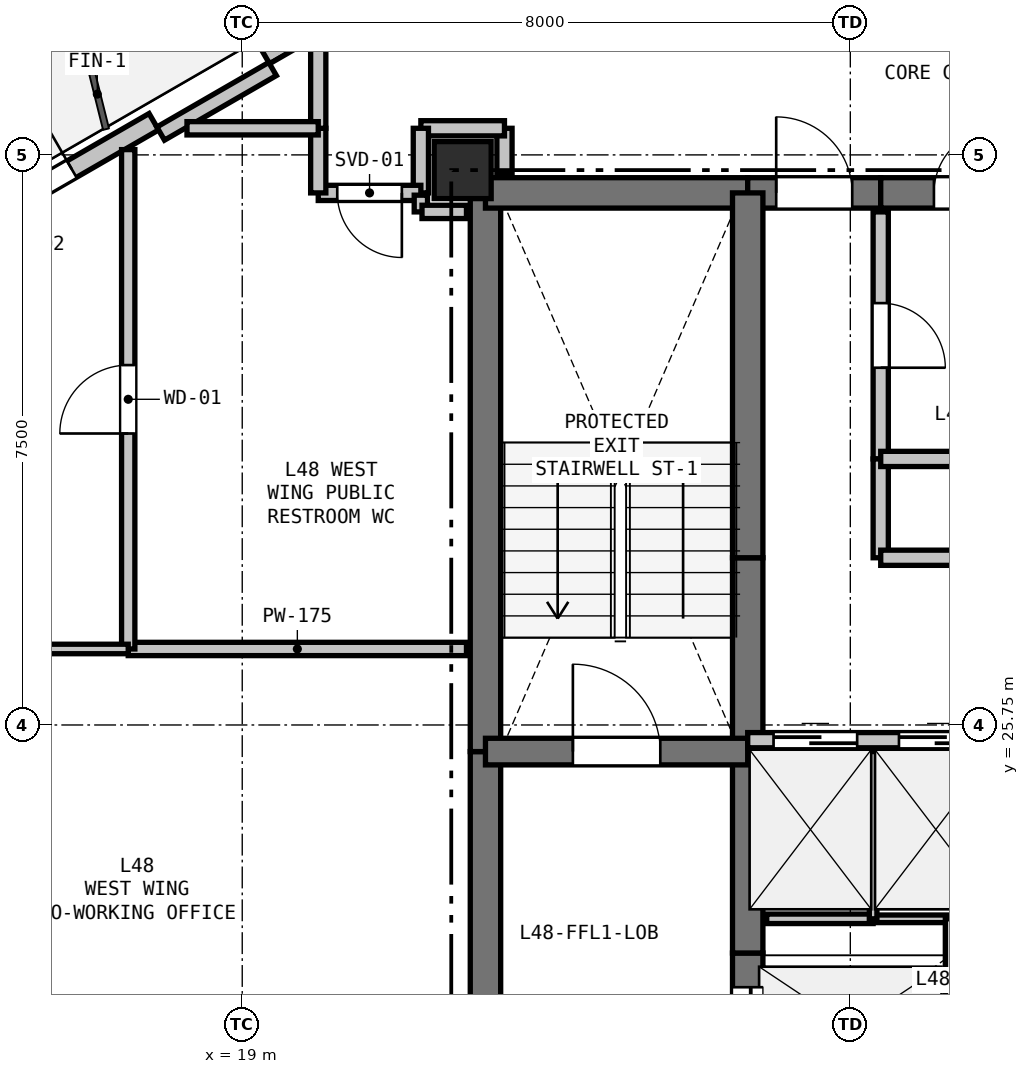
"""IFC4 building model, lengths in metres.
Left out: names, types, materials, properties, quantities, classifications, styles, units other than length and angle.
Written with IfcOpenShell. Run it as: python <this file> out.ifc"""

import sys

from ifc_helpers import new_model, si_unit, direction, frame, frame_2d, origin, origin_2d, place, context, subcontext, project, spatial, rectangle, extrude, element, fill, save


model = new_model("IFC4")
c1 = context("Model", 3, precision=1e-05, world=origin(), true_north=direction((0.0, 1.0)))
c2 = subcontext(c1, "Body", "Model", "MODEL_VIEW")
j1 = project(units=[si_unit("LENGTHUNIT", "METRE"), si_unit("PLANEANGLEUNIT", "RADIAN")], contexts=[c1])
p1 = place(None, origin())
s1 = spatial("IfcSite", under=j1, at=p1, CompositionType="ELEMENT")
p2 = place(p1, origin())
s2 = spatial("IfcBuilding", under=s1, at=p2, CompositionType="ELEMENT")
p3 = place(p2, frame((0.0, 0.0, 175.5)))
s3 = spatial("IfcBuildingStorey", under=s2, at=p3, CompositionType="ELEMENT", Elevation=175.5)
p4 = place(p3, frame((21.9, 33.05, 0.0), z_axis=(0.0, 0.0, 1.0), x_axis=(1.0, 0.0, 0.0)))
e1 = element("IfcColumn", 1, at=p4, inside=s3, PredefinedType="COLUMN", context=c2, shape_type="SweptSolid", body=[
    extrude(rectangle(XDim=0.75, YDim=0.75, at=origin_2d()), origin(), (0.0, 0.0, 1.0), 3.3),
])
p5 = place(p3, frame((9.438, 28.837, 0.0), z_axis=(0.0, 0.0, 1.0), x_axis=(0.866027133173, 0.499997004599, 0.0)))
e2 = element("IfcWall", 2, at=p5, inside=s3, PredefinedType="SOLIDWALL", context=c2, shape_type="SweptSolid", body=[
    extrude(rectangle(XDim=9.699, YDim=0.25, at=frame_2d((4.849, 0.0))), origin(), (0.0, 0.0, 1.0), 2.69),
])
p6 = place(p5, frame((7.352, 0.0, 0.0)))
e3 = element("IfcOpeningElement", 3, at=p6, cuts=e2, PredefinedType="OPENING", context=c2, shape_type="SweptSolid", body=[
    extrude(rectangle(XDim=1.1, YDim=2.1, at=frame_2d((0.55, 1.05))), frame((0.0, 0.135, 0.0), z_axis=(0.0, -1.0, 0.0), x_axis=(1.0, 0.0, 0.0)), (0.0, 0.0, 1.0), 0.27),
])
p7 = place(p3, frame((19.309, 34.536, 0.0), z_axis=(0.0, 0.0, 1.0), x_axis=(0.866020680503, 0.500008180874, 0.0)))
e4 = element("IfcWall", 4, at=p7, inside=s3, PredefinedType="PARAPET", context=c2, shape_type="SweptSolid", body=[
    extrude(rectangle(XDim=8.999, YDim=0.2, at=frame_2d((4.5, 0.0))), origin(), (0.0, 0.0, 1.0), 0.2),
])
p8 = place(p3, frame((17.927, 33.53, 0.0), z_axis=(0.0, 0.0, 1.0), x_axis=(0.86605165483, 0.499954529098, 0.0)))
e5 = element("IfcWall", 5, at=p8, inside=s3, PredefinedType="PARAPET", context=c2, shape_type="SweptSolid", body=[
    extrude(rectangle(XDim=1.7, YDim=0.2, at=frame_2d((0.85, 0.0))), origin(), (0.0, 0.0, 1.0), 2.69),
])
p9 = place(p3, frame((17.837, 19.814, 0.0), z_axis=(0.0, 0.0, 1.0), x_axis=(-0.866027133173, 0.499997004599, 0.0)))
e6 = element("IfcWall", 6, at=p9, inside=s3, PredefinedType="SOLIDWALL", context=c2, shape_type="SweptSolid", body=[
    extrude(rectangle(XDim=9.699, YDim=0.25, at=frame_2d((4.849, 0.0))), origin(), (0.0, 0.0, 1.0), 2.69),
])
p10 = place(p3, frame((22.2, 20.75, 0.0), z_axis=(0.0, 0.0, 1.0), x_axis=(0.0, 1.0, 0.0)))
e7 = element("IfcWall", 7, at=p10, inside=s3, PredefinedType="SHEAR", context=c2, shape_type="SweptSolid", body=[
    extrude(rectangle(XDim=4.65, YDim=0.4, at=frame_2d((2.325, 0.0))), origin(), (0.0, 0.0, 1.0), 3.07),
])
p11 = place(p3, frame((22.2, 25.4, 0.0), z_axis=(0.0, 0.0, 1.0), x_axis=(0.0, 1.0, 0.0)))
e8 = element("IfcWall", 8, at=p11, inside=s3, PredefinedType="SHEAR", context=c2, shape_type="SweptSolid", body=[
    extrude(rectangle(XDim=7.35, YDim=0.4, at=frame_2d((3.675, 0.0))), origin(), (0.0, 0.0, 1.0), 3.07),
])
p12 = place(p3, frame((22.2, 32.75, 0.0), z_axis=(0.0, 0.0, 1.0), x_axis=(1.0, 0.0, 0.0)))
e9 = element("IfcWall", 9, at=p12, inside=s3, PredefinedType="SHEAR", context=c2, shape_type="SweptSolid", body=[
    extrude(rectangle(XDim=3.45, YDim=0.4, at=frame_2d((1.725, 0.0))), origin(), (0.0, 0.0, 1.0), 3.07),
])
p13 = place(p3, frame((25.65, 32.75, 0.0), z_axis=(0.0, 0.0, 1.0), x_axis=(1.0, 0.0, 0.0)))
e10 = element("IfcWall", 10, at=p13, inside=s3, PredefinedType="SHEAR", context=c2, shape_type="SweptSolid", body=[
    extrude(rectangle(XDim=1.75, YDim=0.4, at=frame_2d((0.875, 0.0))), origin(), (0.0, 0.0, 1.0), 3.07),
])
p14 = place(p13, frame((0.375, 0.0, 0.0)))
e11 = element("IfcOpeningElement", 11, at=p14, cuts=e10, PredefinedType="OPENING", context=c2, shape_type="SweptSolid", body=[
    extrude(rectangle(XDim=1.0, YDim=2.15, at=frame_2d((0.5, 1.075))), frame((0.0, 0.21, 0.0), z_axis=(0.0, -1.0, 0.0), x_axis=(1.0, 0.0, 0.0)), (0.0, 0.0, 1.0), 0.42),
])
p15 = place(p3, frame((27.4, 32.75, 0.0), z_axis=(0.0, 0.0, 1.0), x_axis=(1.0, 0.0, 0.0)))
e12 = element("IfcWall", 12, at=p15, inside=s3, PredefinedType="SHEAR", context=c2, shape_type="SweptSolid", body=[
    extrude(rectangle(XDim=2.25, YDim=0.4, at=frame_2d((1.125, 0.0))), origin(), (0.0, 0.0, 1.0), 3.07),
])
p16 = place(p15, frame((0.7, 0.0, 0.0)))
e13 = element("IfcOpeningElement", 13, at=p16, cuts=e12, PredefinedType="OPENING", context=c2, shape_type="SweptSolid", body=[
    extrude(rectangle(XDim=0.85, YDim=2.1, at=frame_2d((0.425, 1.05))), frame((0.0, 0.21, 0.0), z_axis=(0.0, -1.0, 0.0), x_axis=(1.0, 0.0, 0.0)), (0.0, 0.0, 1.0), 0.42),
])
p17 = place(p3, frame((25.65, 20.75, 0.0), z_axis=(0.0, 0.0, 1.0), x_axis=(0.0, 1.0, 0.0)))
e14 = element("IfcWall", 14, at=p17, inside=s3, PredefinedType="SHEAR", context=c2, shape_type="SweptSolid", body=[
    extrude(rectangle(XDim=2.0, YDim=0.4, at=frame_2d((1.0, 0.0))), origin(), (0.0, 0.0, 1.0), 3.07),
])
p18 = place(p17, frame((0.45, 0.0, 0.0)))
e15 = element("IfcOpeningElement", 15, at=p18, cuts=e14, PredefinedType="OPENING", context=c2, shape_type="SweptSolid", body=[
    extrude(rectangle(XDim=1.1, YDim=2.15, at=frame_2d((0.55, 1.075))), frame((0.0, 0.21, 0.0), z_axis=(0.0, -1.0, 0.0), x_axis=(1.0, 0.0, 0.0)), (0.0, 0.0, 1.0), 0.42),
])
p19 = place(p3, frame((25.65, 22.75, 0.0), z_axis=(0.0, 0.0, 1.0), x_axis=(0.0, 1.0, 0.0)))
e16 = element("IfcWall", 16, at=p19, inside=s3, PredefinedType="SHEAR", context=c2, shape_type="SweptSolid", body=[
    extrude(rectangle(XDim=2.8, YDim=0.4, at=frame_2d((1.4, 0.0))), origin(), (0.0, 0.0, 1.0), 3.07),
])
p20 = place(p3, frame((25.65, 25.55, 0.0), z_axis=(0.0, 0.0, 1.0), x_axis=(0.0, 1.0, 0.0)))
e17 = element("IfcWall", 17, at=p20, inside=s3, PredefinedType="SHEAR", context=c2, shape_type="SweptSolid", body=[
    extrude(rectangle(XDim=2.4, YDim=0.4, at=frame_2d((1.2, 0.0))), origin(), (0.0, 0.0, 1.0), 3.07),
])
p21 = place(p3, frame((25.65, 27.95, 0.0), z_axis=(0.0, 0.0, 1.0), x_axis=(0.0, 1.0, 0.0)))
e18 = element("IfcWall", 18, at=p21, inside=s3, PredefinedType="SHEAR", context=c2, shape_type="SweptSolid", body=[
    extrude(rectangle(XDim=4.8, YDim=0.4, at=frame_2d((2.4, 0.0))), origin(), (0.0, 0.0, 1.0), 3.07),
])
p22 = place(p3, frame((22.2, 25.4, 0.0), z_axis=(0.0, 0.0, 1.0), x_axis=(1.0, 0.0, 0.0)))
e19 = element("IfcWall", 19, at=p22, inside=s3, PredefinedType="SHEAR", context=c2, shape_type="SweptSolid", body=[
    extrude(rectangle(XDim=3.45, YDim=0.35, at=frame_2d((1.725, 0.0))), origin(), (0.0, 0.0, 1.0), 3.07),
])
p23 = place(p22, frame((1.15, 0.0, 0.0)))
e20 = element("IfcOpeningElement", 20, at=p23, cuts=e19, PredefinedType="OPENING", context=c2, shape_type="SweptSolid", body=[
    extrude(rectangle(XDim=1.15, YDim=2.15, at=frame_2d((0.575, 1.075))), frame((0.0, 0.185, 0.0), z_axis=(0.0, -1.0, 0.0), x_axis=(1.0, 0.0, 0.0)), (0.0, 0.0, 1.0), 0.37),
])
p24 = place(p3, frame((25.65, 25.55, 0.0), z_axis=(0.0, 0.0, 1.0), x_axis=(1.0, 0.0, 0.0)))
e21 = element("IfcWall", 21, at=p24, inside=s3, PredefinedType="PARTITIONING", context=c2, shape_type="SweptSolid", body=[
    extrude(rectangle(XDim=4.95, YDim=0.2, at=frame_2d((2.475, 0.0))), origin(), (0.0, 0.0, 1.0), 3.07),
])
p25 = place(p24, frame((0.34, 0.0, 0.0)))
e22 = element("IfcOpeningElement", 22, at=p25, cuts=e21, PredefinedType="OPENING", context=c2, shape_type="SweptSolid", body=[
    extrude(rectangle(XDim=1.1, YDim=2.15, at=frame_2d((0.55, 1.075))), frame((0.0, 0.11, 0.0), z_axis=(0.0, -1.0, 0.0), x_axis=(1.0, 0.0, 0.0)), (0.0, 0.0, 1.0), 0.22),
])
p26 = place(p24, frame((1.99, 0.0, 0.0)))
e23 = element("IfcOpeningElement", 23, at=p26, cuts=e21, PredefinedType="OPENING", context=c2, shape_type="SweptSolid", body=[
    extrude(rectangle(XDim=1.1, YDim=2.15, at=frame_2d((0.55, 1.075))), frame((0.0, 0.11, 0.0), z_axis=(0.0, -1.0, 0.0), x_axis=(1.0, 0.0, 0.0)), (0.0, 0.0, 1.0), 0.22),
])
p27 = place(p24, frame((3.64, 0.0, 0.0)))
e24 = element("IfcOpeningElement", 24, at=p27, cuts=e21, PredefinedType="OPENING", context=c2, shape_type="SweptSolid", body=[
    extrude(rectangle(XDim=1.1, YDim=2.15, at=frame_2d((0.55, 1.075))), frame((0.0, 0.11, 0.0), z_axis=(0.0, -1.0, 0.0), x_axis=(1.0, 0.0, 0.0)), (0.0, 0.0, 1.0), 0.22),
])
p28 = place(p3, frame((25.9, 23.2, 0.0), z_axis=(0.0, 0.0, 1.0), x_axis=(1.0, 0.0, 0.0)))
e25 = element("IfcWall", 25, at=p28, inside=s3, PredefinedType="PARTITIONING", context=c2, shape_type="SweptSolid", body=[
    extrude(rectangle(XDim=1.4, YDim=0.125, at=frame_2d((0.7, 0.0))), origin(), (0.0, 0.0, 1.0), 3.07),
])
p29 = place(p3, frame((27.3, 23.2, 0.0), z_axis=(0.0, 0.0, 1.0), x_axis=(1.0, 0.0, 0.0)))
e26 = element("IfcWall", 26, at=p29, inside=s3, PredefinedType="PARTITIONING", context=c2, shape_type="SweptSolid", body=[
    extrude(rectangle(XDim=1.05, YDim=0.1, at=frame_2d((0.525, 0.0))), origin(), (0.0, 0.0, 1.0), 3.07),
])
p30 = place(p3, frame((28.35, 23.2, 0.0), z_axis=(0.0, 0.0, 1.0), x_axis=(0.0, -1.0, 0.0)))
e27 = element("IfcWall", 27, at=p30, inside=s3, PredefinedType="PARTITIONING", context=c2, shape_type="SweptSolid", body=[
    extrude(rectangle(XDim=2.2, YDim=0.2, at=frame_2d((1.1, 0.0))), origin(), (0.0, 0.0, 1.0), 3.07),
])
p31 = place(p3, frame((27.3, 25.4, 0.0), z_axis=(0.0, 0.0, 1.0), x_axis=(0.0, -1.0, 0.0)))
e28 = element("IfcWall", 28, at=p31, inside=s3, PredefinedType="PARTITIONING", context=c2, shape_type="SweptSolid", body=[
    extrude(rectangle(XDim=2.2, YDim=0.1, at=frame_2d((1.1, 0.0))), origin(), (0.0, 0.0, 1.0), 3.07),
])
p32 = place(p3, frame((27.4, 32.5, 0.0), z_axis=(0.0, 0.0, 1.0), x_axis=(0.0, -1.0, 0.0)))
e29 = element("IfcWall", 29, at=p32, inside=s3, PredefinedType="PARTITIONING", context=c2, shape_type="SweptSolid", body=[
    extrude(rectangle(XDim=3.25, YDim=0.2, at=frame_2d((1.625, 0.0))), origin(), (0.0, 0.0, 1.0), 3.07),
])
p33 = place(p32, frame((1.2, 0.0, 0.0)))
e30 = element("IfcOpeningElement", 30, at=p33, cuts=e29, PredefinedType="OPENING", context=c2, shape_type="SweptSolid", body=[
    extrude(rectangle(XDim=0.85, YDim=2.1, at=frame_2d((0.425, 1.05))), frame((0.0, 0.11, 0.0), z_axis=(0.0, -1.0, 0.0), x_axis=(1.0, 0.0, 0.0)), (0.0, 0.0, 1.0), 0.22),
])
p34 = place(p3, frame((27.4, 29.25, 0.0), z_axis=(0.0, 0.0, 1.0), x_axis=(0.0, -1.0, 0.0)))
e31 = element("IfcWall", 31, at=p34, inside=s3, PredefinedType="PARTITIONING", context=c2, shape_type="SweptSolid", body=[
    extrude(rectangle(XDim=1.3, YDim=0.2, at=frame_2d((0.65, 0.0))), origin(), (0.0, 0.0, 1.0), 3.07),
])
p35 = place(p3, frame((27.4, 27.95, 0.0), z_axis=(0.0, 0.0, 1.0), x_axis=(1.0, 0.0, 0.0)))
e32 = element("IfcWall", 32, at=p35, inside=s3, PredefinedType="PARTITIONING", context=c2, shape_type="SweptSolid", body=[
    extrude(rectangle(XDim=4.7, YDim=0.2, at=frame_2d((2.35, 0.0))), origin(), (0.0, 0.0, 1.0), 3.07),
])
p36 = place(p35, frame((1.85, 0.0, 0.0)))
e33 = element("IfcOpeningElement", 33, at=p36, cuts=e32, PredefinedType="OPENING", context=c2, shape_type="SweptSolid", body=[
    extrude(rectangle(XDim=1.0, YDim=2.15, at=frame_2d((0.5, 1.075))), frame((0.0, 0.11, 0.0), z_axis=(0.0, -1.0, 0.0), x_axis=(1.0, 0.0, 0.0)), (0.0, 0.0, 1.0), 0.22),
])
p37 = place(p3, frame((22.45, 33.0, 0.0), z_axis=(0.0, 0.0, 1.0), x_axis=(0.0, 1.0, 0.0)))
e34 = element("IfcWall", 34, at=p37, inside=s3, PredefinedType="PARTITIONING", context=c2, shape_type="SweptSolid", body=[
    extrude(rectangle(XDim=0.6, YDim=0.2, at=frame_2d((0.3, 0.0))), origin(), (0.0, 0.0, 1.0), 2.595),
])
p38 = place(p3, frame((22.45, 33.6, 0.0), z_axis=(0.0, 0.0, 1.0), x_axis=(-1.0, 0.0, 0.0)))
e35 = element("IfcWall", 35, at=p38, inside=s3, PredefinedType="PARTITIONING", context=c2, shape_type="SweptSolid", body=[
    extrude(rectangle(XDim=1.1, YDim=0.2, at=frame_2d((0.55, 0.0))), origin(), (0.0, 0.0, 1.0), 3.07),
])
p39 = place(p3, frame((21.35, 33.6, 0.0), z_axis=(0.0, 0.0, 1.0), x_axis=(0.0, -1.0, 0.0)))
e36 = element("IfcWall", 36, at=p39, inside=s3, PredefinedType="PARTITIONING", context=c2, shape_type="SweptSolid", body=[
    extrude(rectangle(XDim=0.85, YDim=0.2, at=frame_2d((0.425, 0.0))), origin(), (0.0, 0.0, 1.0), 2.518),
])
p40 = place(p3, frame((21.35, 32.75, 0.0), z_axis=(0.0, 0.0, 1.0), x_axis=(-1.0, 0.0, 0.0)))
e37 = element("IfcWall", 37, at=p40, inside=s3, PredefinedType="PARTITIONING", context=c2, shape_type="SweptSolid", body=[
    extrude(rectangle(XDim=1.35, YDim=0.2, at=frame_2d((0.675, 0.0))), origin(), (0.0, 0.0, 1.0), 2.518),
])
p41 = place(p40, frame((0.25, 0.0, 0.0)))
e38 = element("IfcOpeningElement", 38, at=p41, cuts=e37, PredefinedType="OPENING", context=c2, shape_type="SweptSolid", body=[
    extrude(rectangle(XDim=0.85, YDim=2.1, at=frame_2d((0.425, 1.05))), frame((0.0, 0.11, 0.0), z_axis=(0.0, -1.0, 0.0), x_axis=(1.0, 0.0, 0.0)), (0.0, 0.0, 1.0), 0.22),
])
p42 = place(p3, frame((20.0, 32.75, 0.0), z_axis=(0.0, 0.0, 1.0), x_axis=(0.0, 1.0, 0.0)))
e39 = element("IfcWall", 39, at=p42, inside=s3, PredefinedType="PARTITIONING", context=c2, shape_type="SweptSolid", body=[
    extrude(rectangle(XDim=0.85, YDim=0.2, at=frame_2d((0.425, 0.0))), origin(), (0.0, 0.0, 1.0), 3.07),
])
p43 = place(p3, frame((20.0, 33.6, 0.0), z_axis=(0.0, 0.0, 1.0), x_axis=(0.0, 1.0, 0.0)))
e40 = element("IfcWall", 40, at=p43, inside=s3, PredefinedType="PARTITIONING", context=c2, shape_type="SweptSolid", body=[
    extrude(rectangle(XDim=1.291, YDim=0.2, at=frame_2d((0.646, 0.0))), origin(), (0.0, 0.0, 1.0), 2.365),
])
p44 = place(p3, frame((21.35, 32.72, 0.0), z_axis=(0.0, 0.0, 1.0), x_axis=(0.0, -1.0, 0.0)))
e41 = element("IfcWall", 41, at=p44, inside=s3, PredefinedType="PLUMBINGWALL", context=c2, shape_type="SweptSolid", body=[
    extrude(rectangle(XDim=0.22, YDim=0.175, at=frame_2d((0.11, 0.0))), origin(), (0.0, 0.0, 1.0), 3.07),
])
p45 = place(p3, frame((21.365, 32.5, 0.0), z_axis=(0.0, 0.0, 1.0), x_axis=(1.0, 0.0, 0.0)))
e42 = element("IfcWall", 42, at=p45, inside=s3, PredefinedType="PLUMBINGWALL", context=c2, shape_type="SweptSolid", body=[
    extrude(rectangle(XDim=0.585, YDim=0.175, at=frame_2d((0.292, 0.0))), origin(), (0.0, 0.0, 1.0), 2.595),
])
p46 = place(p3, frame((21.95, 26.75, 0.0), z_axis=(0.0, 0.0, 1.0), x_axis=(-1.0, 0.0, 0.0)))
e43 = element("IfcWall", 43, at=p46, inside=s3, PredefinedType="PLUMBINGWALL", context=c2, shape_type="SweptSolid", body=[
    extrude(rectangle(XDim=4.45, YDim=0.175, at=frame_2d((2.225, 0.0))), origin(), (0.0, 0.0, 1.0), 2.595),
])
p47 = place(p3, frame((17.5, 26.75, 0.0), z_axis=(0.0, 0.0, 1.0), x_axis=(0.0, 1.0, 0.0)))
e44 = element("IfcWall", 44, at=p47, inside=s3, PredefinedType="PLUMBINGWALL", context=c2, shape_type="SweptSolid", body=[
    extrude(rectangle(XDim=6.57, YDim=0.175, at=frame_2d((3.285, 0.0))), origin(), (0.0, 0.0, 1.0), 2.365),
])
p48 = place(p47, frame((2.835, 0.0, 0.0)))
e45 = element("IfcOpeningElement", 45, at=p48, cuts=e44, PredefinedType="OPENING", context=c2, shape_type="SweptSolid", body=[
    extrude(rectangle(XDim=0.9, YDim=2.1, at=frame_2d((0.45, 1.05))), frame((0.0, 0.097, 0.0), z_axis=(0.0, -1.0, 0.0), x_axis=(1.0, 0.0, 0.0)), (0.0, 0.0, 1.0), 0.195),
])
p49 = place(p3, frame((18.273, 33.6, 0.0), z_axis=(0.0, 0.0, 1.0), x_axis=(1.0, 0.0, 0.0)))
e46 = element("IfcWall", 46, at=p49, inside=s3, PredefinedType="PLUMBINGWALL", context=c2, shape_type="SweptSolid", body=[
    extrude(rectangle(XDim=1.727, YDim=0.175, at=frame_2d((0.863, 0.0))), origin(), (0.0, 0.0, 1.0), 2.365),
])
p50 = place(p3, frame((32.1, 29.25, 0.0), z_axis=(0.0, 0.0, 1.0), x_axis=(-1.0, 0.0, 0.0)))
e47 = element("IfcWall", 47, at=p50, inside=s3, PredefinedType="PARTITIONING", context=c2, shape_type="SweptSolid", body=[
    extrude(rectangle(XDim=4.7, YDim=0.2, at=frame_2d((2.35, 0.0))), origin(), (0.0, 0.0, 1.0), 3.07),
])
p51 = place(p3, frame((17.5, 26.75, 0.0), z_axis=(0.0, 0.0, 1.0), x_axis=(-1.0, 0.0, 0.0)))
e48 = element("IfcWall", 48, at=p51, inside=s3, PredefinedType="PARTITIONING", context=c2, shape_type="SweptSolid", body=[
    extrude(rectangle(XDim=8.043, YDim=0.125, at=frame_2d((4.022, 0.0))), origin(), (0.0, 0.0, 1.0), 2.735),
])
p52 = place(p6, origin())
e49 = element("IfcDoor", 49, at=p52, inside=s3, OperationType="SINGLE_SWING_RIGHT", PredefinedType="DOOR", context=c2, shape_type="SweptSolid", body=[
    extrude(rectangle(XDim=1.1, YDim=2.1, at=frame_2d((0.55, 1.05))), frame((0.0, 0.025, 0.0), z_axis=(0.0, -1.0, 0.0), x_axis=(1.0, 0.0, 0.0)), (0.0, 0.0, 1.0), 0.05),
])
fill(e3, e49)
p53 = place(p25, origin())
e50 = element("IfcDoor", 50, at=p53, inside=s3, OperationType="SLIDING_TO_LEFT", PredefinedType="DOOR", context=c2, shape_type="SweptSolid", body=[
    extrude(rectangle(XDim=1.1, YDim=2.15, at=frame_2d((0.55, 1.075))), frame((0.0, 0.025, 0.0), z_axis=(0.0, -1.0, 0.0), x_axis=(1.0, 0.0, 0.0)), (0.0, 0.0, 1.0), 0.05),
])
fill(e22, e50)
p54 = place(p26, origin())
e51 = element("IfcDoor", 51, at=p54, inside=s3, OperationType="SLIDING_TO_LEFT", PredefinedType="DOOR", context=c2, shape_type="SweptSolid", body=[
    extrude(rectangle(XDim=1.1, YDim=2.15, at=frame_2d((0.55, 1.075))), frame((0.0, 0.025, 0.0), z_axis=(0.0, -1.0, 0.0), x_axis=(1.0, 0.0, 0.0)), (0.0, 0.0, 1.0), 0.05),
])
fill(e23, e51)
p55 = place(p14, origin())
e52 = element("IfcDoor", 52, at=p55, inside=s3, OperationType="SINGLE_SWING_LEFT", PredefinedType="DOOR", context=c2, shape_type="SweptSolid", body=[
    extrude(rectangle(XDim=1.0, YDim=2.15, at=frame_2d((0.5, 1.075))), frame((0.0, 0.025, 0.0), z_axis=(0.0, -1.0, 0.0), x_axis=(1.0, 0.0, 0.0)), (0.0, 0.0, 1.0), 0.05),
])
fill(e11, e52)
p56 = place(p18, origin())
e53 = element("IfcDoor", 53, at=p56, inside=s3, OperationType="SLIDING_TO_LEFT", PredefinedType="DOOR", context=c2, shape_type="SweptSolid", body=[
    extrude(rectangle(XDim=1.1, YDim=2.15, at=frame_2d((0.55, 1.075))), frame((0.0, 0.025, 0.0), z_axis=(0.0, -1.0, 0.0), x_axis=(1.0, 0.0, 0.0)), (0.0, 0.0, 1.0), 0.05),
])
fill(e15, e53)
p57 = place(p23, origin())
e54 = element("IfcDoor", 54, at=p57, inside=s3, OperationType="SINGLE_SWING_LEFT", PredefinedType="DOOR", context=c2, shape_type="SweptSolid", body=[
    extrude(rectangle(XDim=1.15, YDim=2.15, at=frame_2d((0.575, 1.075))), frame((0.0, 0.025, 0.0), z_axis=(0.0, -1.0, 0.0), x_axis=(1.0, 0.0, 0.0)), (0.0, 0.0, 1.0), 0.05),
])
fill(e20, e54)
p58 = place(p33, origin())
e55 = element("IfcDoor", 55, at=p58, inside=s3, OperationType="SINGLE_SWING_RIGHT", PredefinedType="DOOR", context=c2, shape_type="SweptSolid", body=[
    extrude(rectangle(XDim=0.85, YDim=2.1, at=frame_2d((0.425, 1.05))), frame((0.0, 0.025, 0.0), z_axis=(0.0, -1.0, 0.0), x_axis=(1.0, 0.0, 0.0)), (0.0, 0.0, 1.0), 0.05),
])
fill(e30, e55)
p59 = place(p41, origin())
e56 = element("IfcDoor", 56, at=p59, inside=s3, OperationType="SINGLE_SWING_LEFT", PredefinedType="DOOR", context=c2, shape_type="SweptSolid", body=[
    extrude(rectangle(XDim=0.85, YDim=2.1, at=frame_2d((0.425, 1.05))), frame((0.0, 0.025, 0.0), z_axis=(0.0, -1.0, 0.0), x_axis=(1.0, 0.0, 0.0)), (0.0, 0.0, 1.0), 0.05),
])
fill(e38, e56)
p60 = place(p16, origin())
e57 = element("IfcDoor", 57, at=p60, inside=s3, OperationType="SINGLE_SWING_RIGHT", PredefinedType="DOOR", context=c2, shape_type="SweptSolid", body=[
    extrude(rectangle(XDim=0.85, YDim=2.1, at=frame_2d((0.425, 1.05))), frame((0.0, 0.025, 0.0), z_axis=(0.0, -1.0, 0.0), x_axis=(1.0, 0.0, 0.0)), (0.0, 0.0, 1.0), 0.05),
])
fill(e13, e57)
p61 = place(p48, origin())
e58 = element("IfcDoor", 58, at=p61, inside=s3, OperationType="SINGLE_SWING_LEFT", PredefinedType="DOOR", context=c2, shape_type="SweptSolid", body=[
    extrude(rectangle(XDim=0.9, YDim=2.1, at=frame_2d((0.45, 1.05))), frame((0.0, 0.025, 0.0), z_axis=(0.0, -1.0, 0.0), x_axis=(1.0, 0.0, 0.0)), (0.0, 0.0, 1.0), 0.05),
])
fill(e45, e58)
save(model, sys.argv[1])
